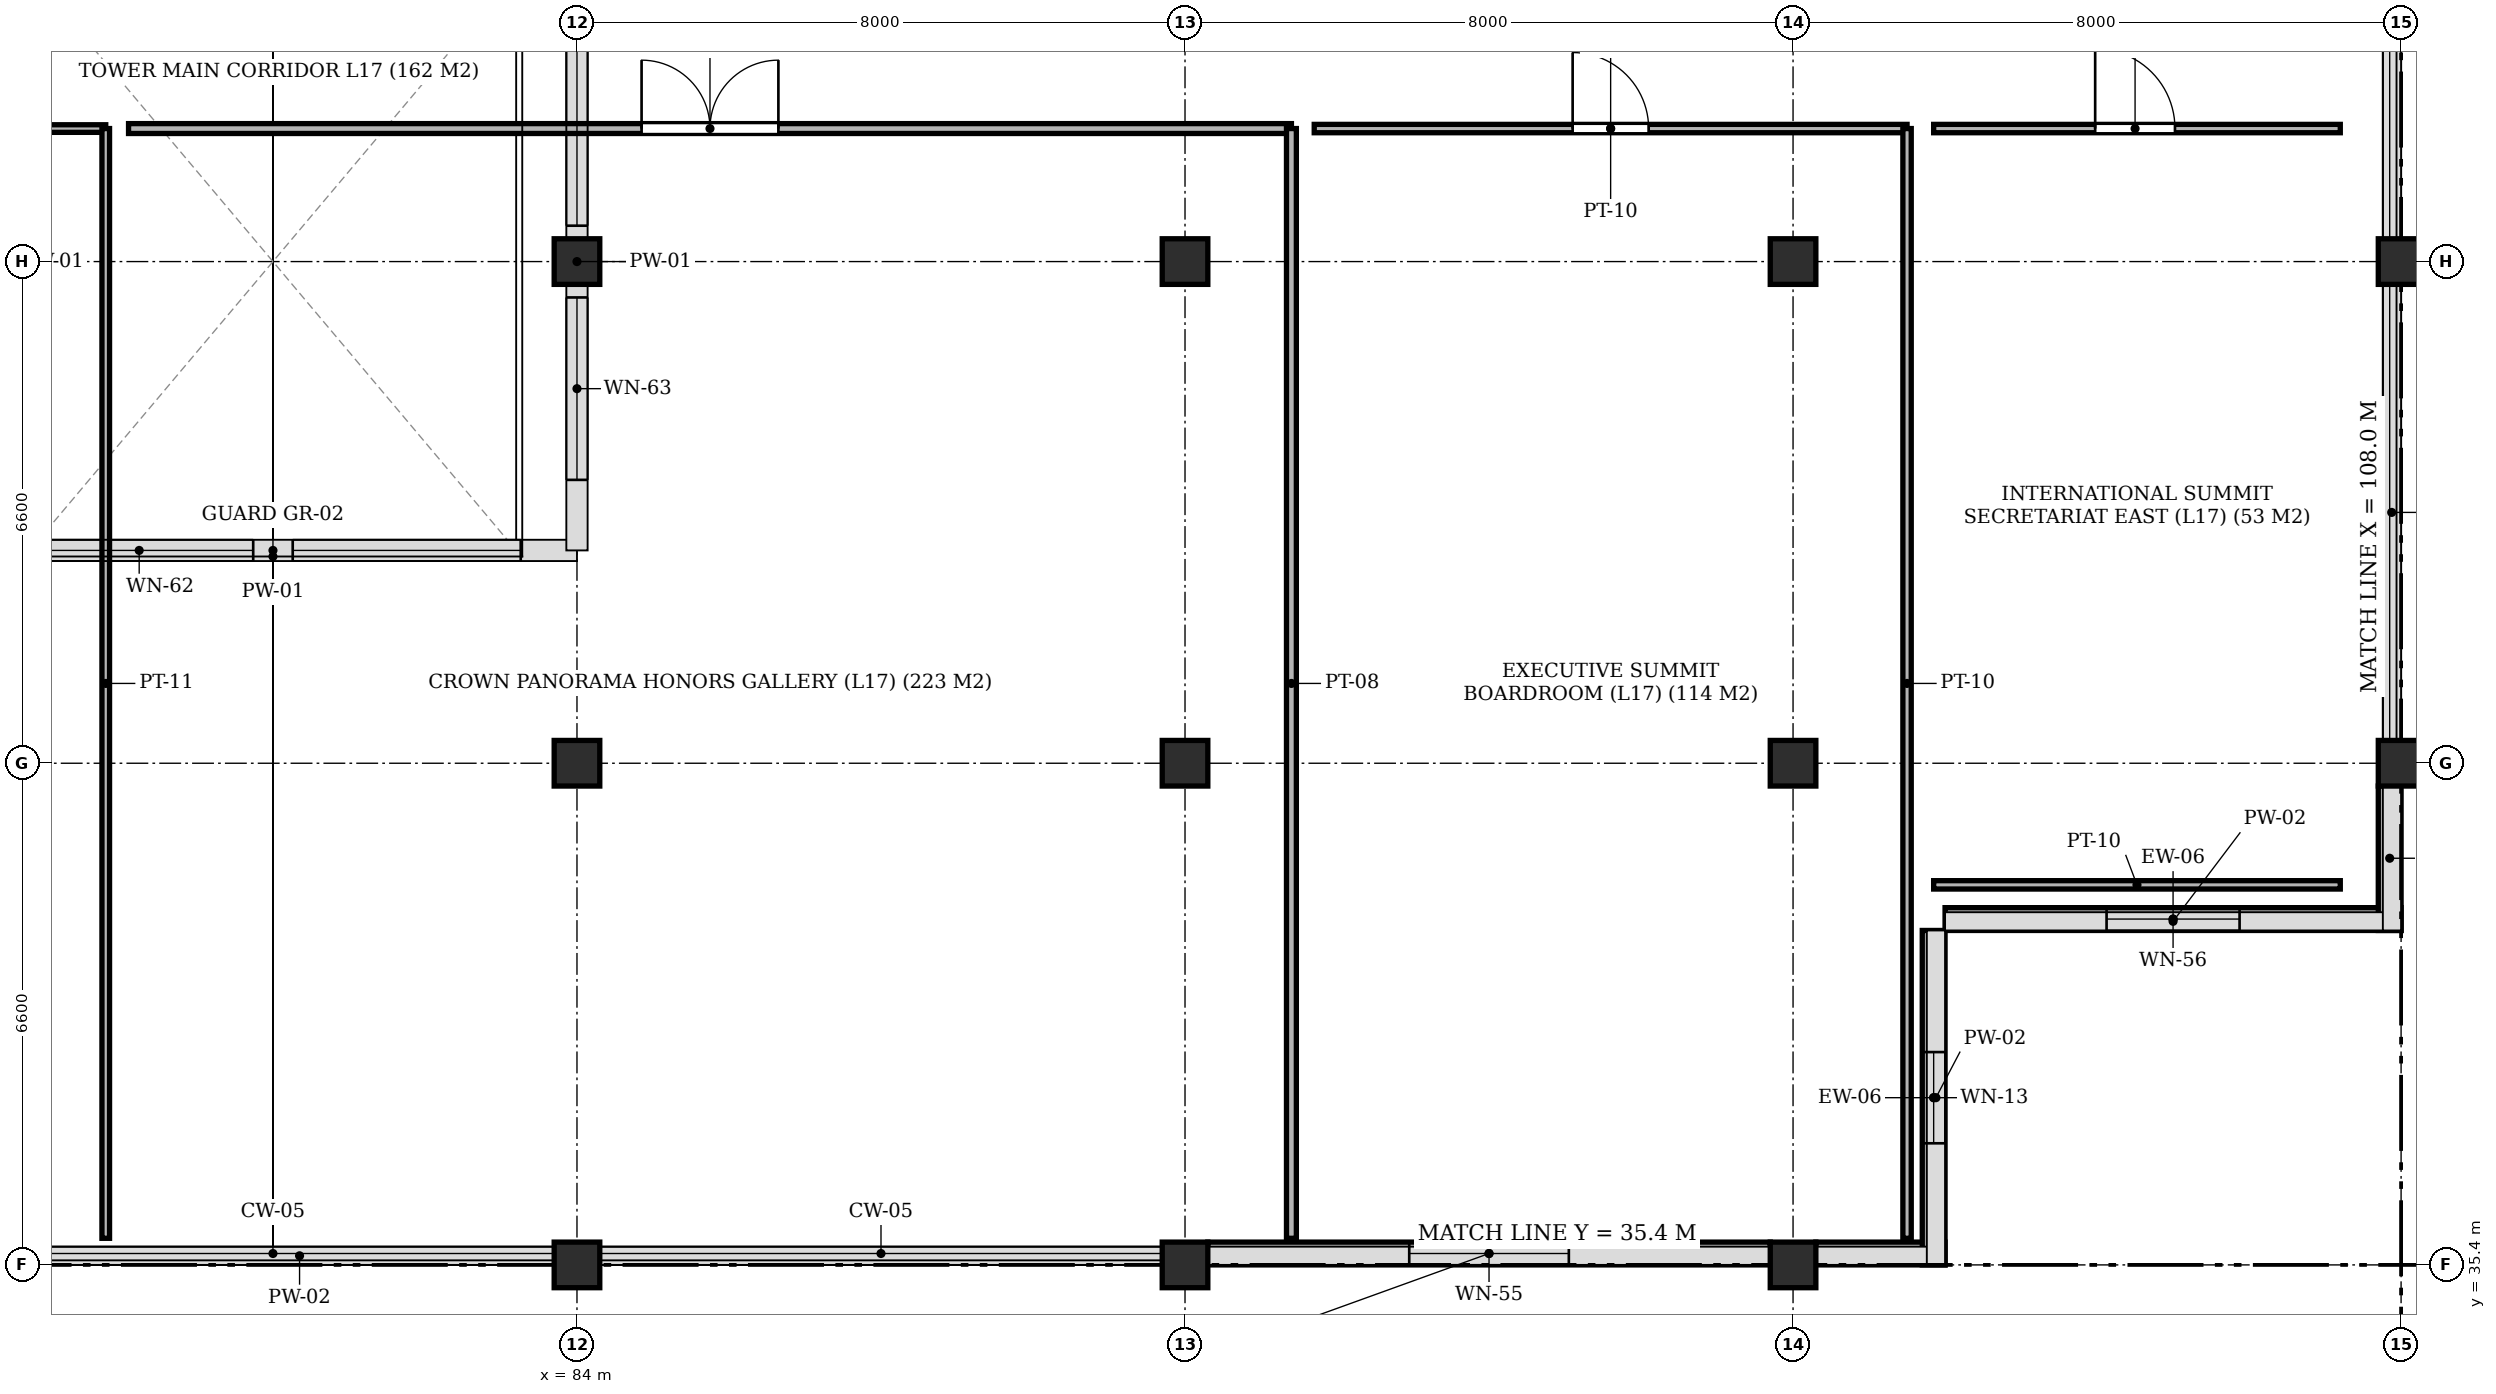
"""IFC4 building model, lengths in metres.
Left out: names, types, materials, properties, quantities, classifications, styles, units other than length and angle.
Written with IfcOpenShell. Run it as: python <this file> out.ifc"""

import sys

from ifc_helpers import new_model, si_unit, direction, frame, frame_2d, origin, origin_2d, place, context, subcontext, project, spatial, rectangle, extrude, element, fill, save


model = new_model("IFC4")
c1 = context("Model", 3, precision=1e-05, world=origin(), true_north=direction((0.0, 1.0)))
c2 = subcontext(c1, "Body", "Model", "MODEL_VIEW")
j1 = project(units=[si_unit("LENGTHUNIT", "METRE"), si_unit("PLANEANGLEUNIT", "RADIAN")], contexts=[c1])
p1 = place(None, origin())
s1 = spatial("IfcSite", under=j1, at=p1, CompositionType="ELEMENT")
p2 = place(p1, origin())
s2 = spatial("IfcBuilding", under=s1, at=p2, CompositionType="ELEMENT")
p3 = place(p2, frame((0.0, 0.0, 66.55)))
s3 = spatial("IfcBuildingStorey", under=s2, at=p3, CompositionType="ELEMENT", Elevation=66.55)
for number, where, z_axis, x_axis in (
    (1, (84.0, 35.4, -0.24), (0.0, 0.0, 1.0), (1.0, 0.0, 0.0)),
    (2, (84.0, 42.0, -0.24), (0.0, 0.0, 1.0), (1.0, 0.0, 0.0)),
    (3, (84.0, 48.6, -0.24), (0.0, 0.0, 1.0), (1.0, 0.0, 0.0)),
    (4, (92.0, 35.4, -0.24), (0.0, 0.0, 1.0), (1.0, 0.0, 0.0)),
    (5, (92.0, 42.0, -0.24), (0.0, 0.0, 1.0), (1.0, 0.0, 0.0)),
    (6, (92.0, 48.6, -0.24), (0.0, 0.0, 1.0), (1.0, 0.0, 0.0)),
    (7, (100.0, 35.4, -0.24), (0.0, 0.0, 1.0), (1.0, 0.0, 0.0)),
    (8, (100.0, 42.0, -0.24), (0.0, 0.0, 1.0), (1.0, 0.0, 0.0)),
    (9, (100.0, 48.6, -0.24), (0.0, 0.0, 1.0), (1.0, 0.0, 0.0)),
    (10, (108.0, 42.0, -0.24), (0.0, 0.0, 1.0), (1.0, 0.0, 0.0)),
    (11, (108.0, 48.6, -0.24), (0.0, 0.0, 1.0), (1.0, 0.0, 0.0)),
):
    element("IfcColumn", number, at=place(p3, frame(where, z_axis=z_axis, x_axis=x_axis)), inside=s3, PredefinedType="COLUMN", context=c2, shape_type="SweptSolid", body=[
        extrude(rectangle(XDim=0.6, YDim=0.6, at=origin_2d()), origin(), (0.0, 0.0, 1.0), 3.19),
    ])
p4 = place(p3, frame((92.3, 35.55, 0.0), z_axis=(0.0, 0.0, 1.0), x_axis=(1.0, 0.0, 0.0)))
e12 = element("IfcWall", 12, at=p4, inside=s3, PredefinedType="SOLIDWALL", context=c2, shape_type="SweptSolid", body=[
    extrude(rectangle(XDim=7.4, YDim=0.3, at=frame_2d((3.7, 0.0))), origin(), (0.0, 0.0, 1.0), 2.53),
])
p5 = place(p4, frame((2.65, 0.0, 0.62)))
e13 = element("IfcOpeningElement", 13, at=p5, cuts=e12, PredefinedType="OPENING", context=c2, shape_type="SweptSolid", body=[
    extrude(rectangle(XDim=2.1, YDim=1.81, at=frame_2d((1.05, 0.905))), frame((0.0, 0.162, 0.0), z_axis=(0.0, -1.0, 0.0), x_axis=(1.0, 0.0, 0.0)), (0.0, 0.0, 1.0), 0.324),
])
p6 = place(p3, frame((100.3, 35.55, 0.0), z_axis=(0.0, 0.0, 1.0), x_axis=(1.0, 0.0, 0.0)))
e14 = element("IfcWall", 14, at=p6, inside=s3, PredefinedType="SOLIDWALL", context=c2, shape_type="SweptSolid", body=[
    extrude(rectangle(XDim=1.7, YDim=0.3, at=frame_2d((0.85, 0.0))), origin(), (0.0, 0.0, 1.0), 2.53),
])
p7 = place(p3, frame((101.85, 35.4, 0.0), z_axis=(0.0, 0.0, 1.0), x_axis=(0.0, 1.0, 0.0)))
e15 = element("IfcWall", 15, at=p7, inside=s3, PredefinedType="SOLIDWALL", context=c2, shape_type="SweptSolid", body=[
    extrude(rectangle(XDim=4.4, YDim=0.3, at=frame_2d((2.2, 0.0))), origin(), (0.0, 0.0, 1.0), 2.53),
])
p8 = place(p7, frame((1.6, 0.0, 0.62)))
e16 = element("IfcOpeningElement", 16, at=p8, cuts=e15, PredefinedType="OPENING", context=c2, shape_type="SweptSolid", body=[
    extrude(rectangle(XDim=1.2, YDim=1.7, at=frame_2d((0.6, 0.85))), frame((0.0, 0.162, 0.0), z_axis=(0.0, -1.0, 0.0), x_axis=(1.0, 0.0, 0.0)), (0.0, 0.0, 1.0), 0.324),
])
p9 = place(p3, frame((102.0, 39.95, 0.0), z_axis=(0.0, 0.0, 1.0), x_axis=(1.0, 0.0, 0.0)))
e17 = element("IfcWall", 17, at=p9, inside=s3, PredefinedType="SOLIDWALL", context=c2, shape_type="SweptSolid", body=[
    extrude(rectangle(XDim=6.0, YDim=0.3, at=frame_2d((3.0, 0.0))), origin(), (0.0, 0.0, 1.0), 2.53),
])
p10 = place(p9, frame((2.125, 0.0, 0.62)))
e18 = element("IfcOpeningElement", 18, at=p10, cuts=e17, PredefinedType="OPENING", context=c2, shape_type="SweptSolid", body=[
    extrude(rectangle(XDim=1.75, YDim=1.81, at=frame_2d((0.875, 0.905))), frame((0.0, 0.162, 0.0), z_axis=(0.0, -1.0, 0.0), x_axis=(1.0, 0.0, 0.0)), (0.0, 0.0, 1.0), 0.324),
])
p11 = place(p3, frame((107.85, 39.8, 0.0), z_axis=(0.0, 0.0, 1.0), x_axis=(0.0, 1.0, 0.0)))
e19 = element("IfcWall", 19, at=p11, inside=s3, PredefinedType="SOLIDWALL", context=c2, shape_type="SweptSolid", body=[
    extrude(rectangle(XDim=1.9, YDim=0.3, at=frame_2d((0.95, 0.0))), origin(), (0.0, 0.0, 1.0), 2.53),
])
p12 = place(p3, frame((76.0, 44.8, 3.25), z_axis=(0.0, 0.0, 1.0), x_axis=(1.0, 0.0, 0.0)))
e20 = element("IfcWall", 20, at=p12, inside=s3, PredefinedType="PARAPET", context=c2, shape_type="SweptSolid", body=[
    extrude(rectangle(XDim=8.0, YDim=0.28, at=frame_2d((4.0, 0.0))), origin(), (0.0, 0.0, 1.0), 2.1),
])
p13 = place(p12, frame((0.74, 0.0, 0.2)))
e21 = element("IfcOpeningElement", 21, at=p13, cuts=e20, PredefinedType="OPENING", context=c2, shape_type="SweptSolid", body=[
    extrude(rectangle(XDim=3.0, YDim=1.45, at=frame_2d((1.5, 0.725))), frame((0.0, 0.152, 0.0), z_axis=(0.0, -1.0, 0.0), x_axis=(1.0, 0.0, 0.0)), (0.0, 0.0, 1.0), 0.304),
])
p14 = place(p12, frame((4.26, 0.0, 0.2)))
e22 = element("IfcOpeningElement", 22, at=p14, cuts=e20, PredefinedType="OPENING", context=c2, shape_type="SweptSolid", body=[
    extrude(rectangle(XDim=3.0, YDim=1.45, at=frame_2d((1.5, 0.725))), frame((0.0, 0.152, 0.0), z_axis=(0.0, -1.0, 0.0), x_axis=(1.0, 0.0, 0.0)), (0.0, 0.0, 1.0), 0.304),
])
p15 = place(p3, frame((84.0, 44.8, 3.25), z_axis=(0.0, 0.0, 1.0), x_axis=(0.0, 1.0, 0.0)))
e23 = element("IfcWall", 23, at=p15, inside=s3, PredefinedType="PARAPET", context=c2, shape_type="SweptSolid", body=[
    extrude(rectangle(XDim=7.6, YDim=0.28, at=frame_2d((3.8, 0.0))), origin(), (0.0, 0.0, 1.0), 2.1),
])
p16 = place(p15, frame((0.928, 0.0, 0.2)))
e24 = element("IfcOpeningElement", 24, at=p16, cuts=e23, PredefinedType="OPENING", context=c2, shape_type="SweptSolid", body=[
    extrude(rectangle(XDim=2.4, YDim=1.45, at=frame_2d((1.2, 0.725))), frame((0.0, 0.152, 0.0), z_axis=(0.0, -1.0, 0.0), x_axis=(1.0, 0.0, 0.0)), (0.0, 0.0, 1.0), 0.304),
])
p17 = place(p15, frame((4.272, 0.0, 0.2)))
e25 = element("IfcOpeningElement", 25, at=p17, cuts=e23, PredefinedType="OPENING", context=c2, shape_type="SweptSolid", body=[
    extrude(rectangle(XDim=2.4, YDim=1.45, at=frame_2d((1.2, 0.725))), frame((0.0, 0.152, 0.0), z_axis=(0.0, -1.0, 0.0), x_axis=(1.0, 0.0, 0.0)), (0.0, 0.0, 1.0), 0.304),
])
p18 = place(p3, frame((58.5, 35.52, 3.25), z_axis=(0.0, 0.0, 1.0), x_axis=(1.0, 0.0, 0.0)))
e26 = element("IfcWall", 26, at=p18, inside=s3, PredefinedType="PARAPET", context=c2, shape_type="SweptSolid", body=[
    extrude(rectangle(XDim=43.5, YDim=0.24, at=frame_2d((21.75, 0.0))), origin(), (0.0, 0.0, 1.0), 1.25),
])
p19 = place(p3, frame((101.88, 35.4, 3.25), z_axis=(0.0, 0.0, 1.0), x_axis=(0.0, 1.0, 0.0)))
e27 = element("IfcWall", 27, at=p19, inside=s3, PredefinedType="PARAPET", context=c2, shape_type="SweptSolid", body=[
    extrude(rectangle(XDim=4.4, YDim=0.24, at=frame_2d((2.2, 0.0))), origin(), (0.0, 0.0, 1.0), 1.25),
])
p20 = place(p3, frame((102.0, 39.92, 3.25), z_axis=(0.0, 0.0, 1.0), x_axis=(1.0, 0.0, 0.0)))
e28 = element("IfcWall", 28, at=p20, inside=s3, PredefinedType="PARAPET", context=c2, shape_type="SweptSolid", body=[
    extrude(rectangle(XDim=6.0, YDim=0.24, at=frame_2d((3.0, 0.0))), origin(), (0.0, 0.0, 1.0), 1.25),
])
p21 = place(p3, frame((107.88, 39.8, 3.25), z_axis=(0.0, 0.0, 1.0), x_axis=(0.0, 1.0, 0.0)))
e29 = element("IfcWall", 29, at=p21, inside=s3, PredefinedType="PARAPET", context=c2, shape_type="SweptSolid", body=[
    extrude(rectangle(XDim=26.2, YDim=0.24, at=frame_2d((13.1, 0.0))), origin(), (0.0, 0.0, 1.0), 1.25),
])
p22 = place(p3, frame((64.9, 50.35, 0.0), z_axis=(0.0, 0.0, 1.0), x_axis=(1.0, 0.0, 0.0)))
e30 = element("IfcWall", 30, at=p22, inside=s3, PredefinedType="PARTITIONING", context=c2, shape_type="SweptSolid", body=[
    extrude(rectangle(XDim=12.9, YDim=0.1, at=frame_2d((6.45, 0.0))), origin(), (0.0, 0.0, 1.0), 2.53),
])
p23 = place(p22, frame((5.65, 0.0, 0.0)))
e31 = element("IfcOpeningElement", 31, at=p23, cuts=e30, PredefinedType="OPENING", context=c2, shape_type="SweptSolid", body=[
    extrude(rectangle(XDim=1.6, YDim=2.2, at=frame_2d((0.8, 1.1))), frame((0.0, 0.062, 0.0), z_axis=(0.0, -1.0, 0.0), x_axis=(1.0, 0.0, 0.0)), (0.0, 0.0, 1.0), 0.124),
])
p24 = place(p3, frame((77.8, 35.75, 0.0), z_axis=(0.0, 0.0, 1.0), x_axis=(0.0, 1.0, 0.0)))
e32 = element("IfcWall", 32, at=p24, inside=s3, PredefinedType="PARTITIONING", context=c2, shape_type="SweptSolid", body=[
    extrude(rectangle(XDim=14.6, YDim=0.1, at=frame_2d((7.3, 0.0))), origin(), (0.0, 0.0, 1.0), 2.53),
])
p25 = place(p3, frame((78.1, 50.35, 0.0), z_axis=(0.0, 0.0, 1.0), x_axis=(1.0, 0.0, 0.0)))
e33 = element("IfcWall", 33, at=p25, inside=s3, PredefinedType="PARTITIONING", context=c2, shape_type="SweptSolid", body=[
    extrude(rectangle(XDim=15.3, YDim=0.13, at=frame_2d((7.65, 0.0))), origin(), (0.0, 0.0, 1.0), 2.53),
])
p26 = place(p25, frame((6.75, 0.0, 0.0)))
e34 = element("IfcOpeningElement", 34, at=p26, cuts=e33, PredefinedType="OPENING", context=c2, shape_type="SweptSolid", body=[
    extrude(rectangle(XDim=1.8, YDim=2.25, at=frame_2d((0.9, 1.125))), frame((0.0, 0.077, 0.0), z_axis=(0.0, -1.0, 0.0), x_axis=(1.0, 0.0, 0.0)), (0.0, 0.0, 1.0), 0.154),
])
p27 = place(p3, frame((93.4, 35.75, 0.0), z_axis=(0.0, 0.0, 1.0), x_axis=(0.0, 1.0, 0.0)))
e35 = element("IfcWall", 35, at=p27, inside=s3, PredefinedType="PARTITIONING", context=c2, shape_type="SweptSolid", body=[
    extrude(rectangle(XDim=14.6, YDim=0.13, at=frame_2d((7.3, 0.0))), origin(), (0.0, 0.0, 1.0), 2.53),
])
p28 = place(p3, frame((93.7, 50.35, 0.0), z_axis=(0.0, 0.0, 1.0), x_axis=(1.0, 0.0, 0.0)))
e36 = element("IfcWall", 36, at=p28, inside=s3, PredefinedType="PARTITIONING", context=c2, shape_type="SweptSolid", body=[
    extrude(rectangle(XDim=7.8, YDim=0.11, at=frame_2d((3.9, 0.0))), origin(), (0.0, 0.0, 1.0), 2.53),
])
p29 = place(p28, frame((3.4, 0.0, 0.0)))
e37 = element("IfcOpeningElement", 37, at=p29, cuts=e36, PredefinedType="OPENING", context=c2, shape_type="SweptSolid", body=[
    extrude(rectangle(XDim=1.0, YDim=2.15, at=frame_2d((0.5, 1.075))), frame((0.0, 0.067, 0.0), z_axis=(0.0, -1.0, 0.0), x_axis=(1.0, 0.0, 0.0)), (0.0, 0.0, 1.0), 0.134),
])
p30 = place(p3, frame((101.5, 35.75, 0.0), z_axis=(0.0, 0.0, 1.0), x_axis=(0.0, 1.0, 0.0)))
e38 = element("IfcWall", 38, at=p30, inside=s3, PredefinedType="PARTITIONING", context=c2, shape_type="SweptSolid", body=[
    extrude(rectangle(XDim=14.6, YDim=0.11, at=frame_2d((7.3, 0.0))), origin(), (0.0, 0.0, 1.0), 2.53),
])
p31 = place(p3, frame((101.85, 40.4, 0.0), z_axis=(0.0, 0.0, 1.0), x_axis=(1.0, 0.0, 0.0)))
e39 = element("IfcWall", 39, at=p31, inside=s3, PredefinedType="PARTITIONING", context=c2, shape_type="SweptSolid", body=[
    extrude(rectangle(XDim=5.35, YDim=0.11, at=frame_2d((2.675, 0.0))), origin(), (0.0, 0.0, 1.0), 2.53),
])
p32 = place(p3, frame((101.85, 50.35, 0.0), z_axis=(0.0, 0.0, 1.0), x_axis=(1.0, 0.0, 0.0)))
e40 = element("IfcWall", 40, at=p32, inside=s3, PredefinedType="PARTITIONING", context=c2, shape_type="SweptSolid", body=[
    extrude(rectangle(XDim=5.35, YDim=0.11, at=frame_2d((2.675, 0.0))), origin(), (0.0, 0.0, 1.0), 2.53),
])
p33 = place(p32, frame((2.125, 0.0, 0.0)))
e41 = element("IfcOpeningElement", 41, at=p33, cuts=e40, PredefinedType="OPENING", context=c2, shape_type="SweptSolid", body=[
    extrude(rectangle(XDim=1.05, YDim=2.15, at=frame_2d((0.525, 1.075))), frame((0.0, 0.067, 0.0), z_axis=(0.0, -1.0, 0.0), x_axis=(1.0, 0.0, 0.0)), (0.0, 0.0, 1.0), 0.134),
])
p34 = place(p5, origin())
e42 = element("IfcWindow", 42, at=p34, inside=s3, PartitioningType="SINGLE_PANEL", PredefinedType="WINDOW", context=c2, shape_type="SweptSolid", body=[
    extrude(rectangle(XDim=2.1, YDim=1.81, at=frame_2d((1.05, 0.905))), frame((0.0, 0.03, 0.0), z_axis=(0.0, -1.0, 0.0), x_axis=(1.0, 0.0, 0.0)), (0.0, 0.0, 1.0), 0.06),
])
fill(e13, e42)
p35 = place(p8, origin())
e43 = element("IfcWindow", 43, at=p35, inside=s3, PartitioningType="SINGLE_PANEL", PredefinedType="WINDOW", context=c2, shape_type="SweptSolid", body=[
    extrude(rectangle(XDim=1.2, YDim=1.7, at=frame_2d((0.6, 0.85))), frame((0.0, 0.03, 0.0), z_axis=(0.0, -1.0, 0.0), x_axis=(1.0, 0.0, 0.0)), (0.0, 0.0, 1.0), 0.06),
])
fill(e16, e43)
p36 = place(p10, origin())
e44 = element("IfcWindow", 44, at=p36, inside=s3, PartitioningType="SINGLE_PANEL", PredefinedType="WINDOW", context=c2, shape_type="SweptSolid", body=[
    extrude(rectangle(XDim=1.75, YDim=1.81, at=frame_2d((0.875, 0.905))), frame((0.0, 0.03, 0.0), z_axis=(0.0, -1.0, 0.0), x_axis=(1.0, 0.0, 0.0)), (0.0, 0.0, 1.0), 0.06),
])
fill(e18, e44)
p37 = place(p13, origin())
e45 = element("IfcWindow", 45, at=p37, inside=s3, PartitioningType="SINGLE_PANEL", PredefinedType="SKYLIGHT", context=c2, shape_type="SweptSolid", body=[
    extrude(rectangle(XDim=3.0, YDim=1.45, at=frame_2d((1.5, 0.725))), frame((0.0, 0.03, 0.0), z_axis=(0.0, -1.0, 0.0), x_axis=(1.0, 0.0, 0.0)), (0.0, 0.0, 1.0), 0.06),
])
fill(e21, e45)
p38 = place(p14, origin())
e46 = element("IfcWindow", 46, at=p38, inside=s3, PartitioningType="SINGLE_PANEL", PredefinedType="SKYLIGHT", context=c2, shape_type="SweptSolid", body=[
    extrude(rectangle(XDim=3.0, YDim=1.45, at=frame_2d((1.5, 0.725))), frame((0.0, 0.03, 0.0), z_axis=(0.0, -1.0, 0.0), x_axis=(1.0, 0.0, 0.0)), (0.0, 0.0, 1.0), 0.06),
])
fill(e22, e46)
p39 = place(p16, origin())
e47 = element("IfcWindow", 47, at=p39, inside=s3, PartitioningType="SINGLE_PANEL", PredefinedType="SKYLIGHT", context=c2, shape_type="SweptSolid", body=[
    extrude(rectangle(XDim=2.4, YDim=1.45, at=frame_2d((1.2, 0.725))), frame((0.0, 0.03, 0.0), z_axis=(0.0, -1.0, 0.0), x_axis=(1.0, 0.0, 0.0)), (0.0, 0.0, 1.0), 0.06),
])
fill(e24, e47)
p40 = place(p17, origin())
e48 = element("IfcWindow", 48, at=p40, inside=s3, PartitioningType="SINGLE_PANEL", PredefinedType="SKYLIGHT", context=c2, shape_type="SweptSolid", body=[
    extrude(rectangle(XDim=2.4, YDim=1.45, at=frame_2d((1.2, 0.725))), frame((0.0, 0.03, 0.0), z_axis=(0.0, -1.0, 0.0), x_axis=(1.0, 0.0, 0.0)), (0.0, 0.0, 1.0), 0.06),
])
fill(e25, e48)
p41 = place(p26, origin())
e49 = element("IfcDoor", 49, at=p41, inside=s3, OperationType="DOUBLE_DOOR_SINGLE_SWING", PredefinedType="DOOR", context=c2, shape_type="SweptSolid", body=[
    extrude(rectangle(XDim=1.8, YDim=2.25, at=frame_2d((0.9, 1.125))), frame((0.0, 0.025, 0.0), z_axis=(0.0, -1.0, 0.0), x_axis=(1.0, 0.0, 0.0)), (0.0, 0.0, 1.0), 0.05),
])
fill(e34, e49)
p42 = place(p29, origin())
e50 = element("IfcDoor", 50, at=p42, inside=s3, OperationType="SINGLE_SWING_LEFT", PredefinedType="DOOR", context=c2, shape_type="SweptSolid", body=[
    extrude(rectangle(XDim=1.0, YDim=2.15, at=frame_2d((0.5, 1.075))), frame((0.0, 0.025, 0.0), z_axis=(0.0, -1.0, 0.0), x_axis=(1.0, 0.0, 0.0)), (0.0, 0.0, 1.0), 0.05),
])
fill(e37, e50)
p43 = place(p33, origin())
e51 = element("IfcDoor", 51, at=p43, inside=s3, OperationType="SINGLE_SWING_LEFT", PredefinedType="DOOR", context=c2, shape_type="SweptSolid", body=[
    extrude(rectangle(XDim=1.05, YDim=2.15, at=frame_2d((0.525, 1.075))), frame((0.0, 0.025, 0.0), z_axis=(0.0, -1.0, 0.0), x_axis=(1.0, 0.0, 0.0)), (0.0, 0.0, 1.0), 0.05),
])
fill(e41, e51)
save(model, sys.argv[1])
